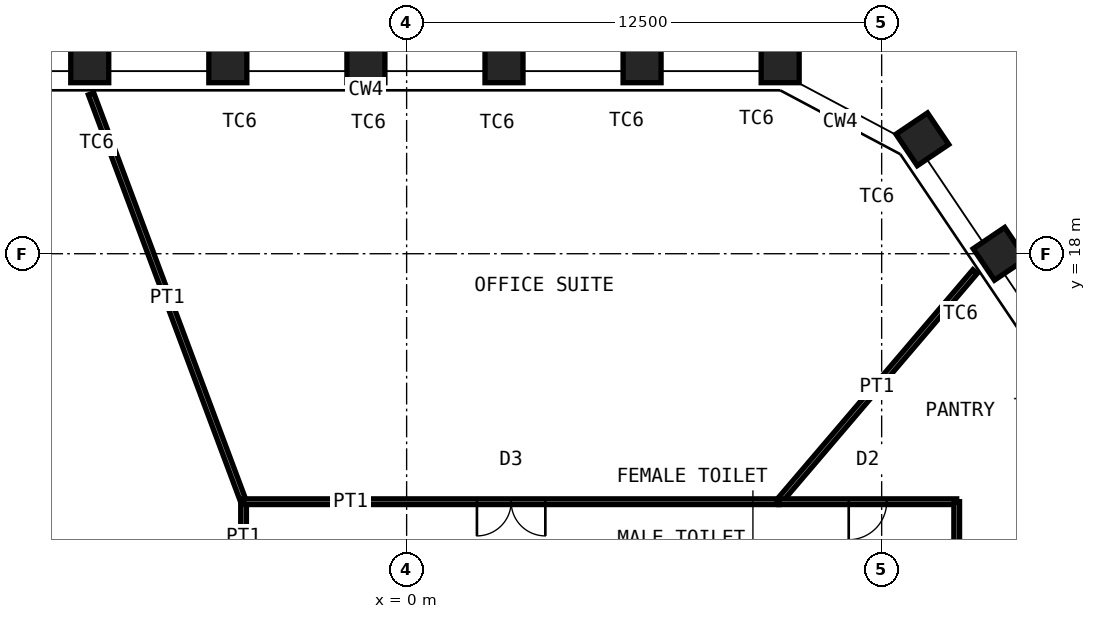
"""IFC4 building model, lengths in metres.
Left out: names, types, materials, properties, quantities, classifications, styles, units other than length and angle.
Written with IfcOpenShell. Run it as: python <this file> out.ifc"""

import sys

from ifc_helpers import new_model, si_unit, direction, frame, frame_2d, origin, origin_2d, place, context, subcontext, project, spatial, rectangle, hollow_rectangle, extrude, element, fill, save


model = new_model("IFC4")
c1 = context("Model", 3, precision=1e-05, world=origin(), true_north=direction((0.0, 1.0)))
c2 = subcontext(c1, "Body", "Model", "MODEL_VIEW")
j1 = project(units=[si_unit("LENGTHUNIT", "METRE"), si_unit("PLANEANGLEUNIT", "RADIAN")], contexts=[c1])
p1 = place(None, origin())
s1 = spatial("IfcSite", under=j1, at=p1, CompositionType="ELEMENT")
p2 = place(p1, origin())
s2 = spatial("IfcBuilding", under=s1, at=p2, CompositionType="ELEMENT")
p3 = place(p2, frame((0.0, 0.0, 247.6)))
s3 = spatial("IfcBuildingStorey", under=s2, at=p3, CompositionType="ELEMENT", Elevation=247.6)
for number, where, z_axis, x_axis in (
    (1, (-8.338, 23.0, 0.0), (0.0, 0.0, 1.0), (-1.0, 0.0, 0.0)),
    (2, (-4.705, 23.0, 0.0), (0.0, 0.0, 1.0), (-1.0, 0.0, 0.0)),
    (3, (-1.071, 23.0, 0.0), (0.0, 0.0, 1.0), (-1.0, 0.0, 0.0)),
    (4, (2.562, 23.0, 0.0), (0.0, 0.0, 1.0), (-1.0, 0.0, 0.0)),
    (5, (6.196, 23.0, 0.0), (0.0, 0.0, 1.0), (-1.0, 0.0, 0.0)),
    (6, (9.829, 23.0, 0.0), (0.0, 0.0, 1.0), (-1.0, 0.0, 0.0)),
    (7, (13.571, 21.01, 0.0), (0.0, 0.0, 1.0), (-0.559, 0.829, 0.0)),
    (8, (15.603, 17.998, 0.0), (0.0, 0.0, 1.0), (-0.559, 0.829, 0.0)),
):
    element("IfcColumn", number, at=place(p3, frame(where, z_axis=z_axis, x_axis=x_axis)), inside=s3, PredefinedType="COLUMN", context=c2, shape_type="SweptSolid", body=[
        extrude(hollow_rectangle(XDim=1.0, YDim=1.0, WallThickness=0.06, at=origin_2d()), origin(), (0.0, 0.0, 1.0), 4.2),
    ])
p4 = place(p3, frame((-4.291, 9.6, 0.0), z_axis=(0.0, 0.0, 1.0), x_axis=(0.0, 1.0, 0.0)))
e9 = element("IfcWall", 9, at=p4, inside=s3, PredefinedType="PARTITIONING", context=c2, shape_type="SweptSolid", body=[
    extrude(rectangle(XDim=1.875, YDim=0.15, at=frame_2d((0.938, 0.0))), origin(), (0.0, 0.0, 1.0), 4.03),
])
p5 = place(p3, frame((-8.303, 22.206, 0.0), z_axis=(0.0, 0.0, 1.0), x_axis=(0.350242883069, -0.936658914899, 0.0)))
e10 = element("IfcWall", 10, at=p5, inside=s3, PredefinedType="PARTITIONING", context=c2, shape_type="SweptSolid", body=[
    extrude(rectangle(XDim=11.457, YDim=0.15, at=frame_2d((5.729, 0.0))), origin(), (0.0, 0.0, 1.0), 2.93),
])
p6 = place(p3, frame((-4.291, 11.475, 0.0), z_axis=(0.0, 0.0, 1.0), x_axis=(1.0, 0.0, 0.0)))
e11 = element("IfcWall", 11, at=p6, inside=s3, PredefinedType="PARTITIONING", context=c2, shape_type="SweptSolid", body=[
    extrude(rectangle(XDim=14.082, YDim=0.15, at=frame_2d((7.041, 0.0))), origin(), (0.0, 0.0, 1.0), 4.03),
])
p7 = place(p6, frame((6.141, 0.0, 0.0)))
e12 = element("IfcOpeningElement", 12, at=p7, cuts=e11, PredefinedType="OPENING", context=c2, shape_type="SweptSolid", body=[
    extrude(rectangle(XDim=1.8, YDim=2.4, at=frame_2d((0.9, 1.2))), frame((0.0, 0.085, 0.0), z_axis=(0.0, -1.0, 0.0), x_axis=(1.0, 0.0, 0.0)), (0.0, 0.0, 1.0), 0.17),
])
p8 = place(p3, frame((14.958, 17.531, 0.0), z_axis=(0.0, 0.0, 1.0), x_axis=(-0.649097500837, -0.760705221756, 0.0)))
e13 = element("IfcWall", 13, at=p8, inside=s3, PredefinedType="PARTITIONING", context=c2, shape_type="SweptSolid", body=[
    extrude(rectangle(XDim=7.96, YDim=0.15, at=frame_2d((3.98, 0.0))), origin(), (0.0, 0.0, 1.0), 2.93),
])
p9 = place(p3, frame((9.791, 11.475, 0.0), z_axis=(0.0, 0.0, 1.0), x_axis=(1.0, 0.0, 0.0)))
e14 = element("IfcWall", 14, at=p9, inside=s3, PredefinedType="PARTITIONING", context=c2, shape_type="SweptSolid", body=[
    extrude(rectangle(XDim=4.684, YDim=0.15, at=frame_2d((2.342, 0.0))), origin(), (0.0, 0.0, 1.0), 4.03),
])
p10 = place(p9, frame((1.842, 0.0, 0.0)))
e15 = element("IfcOpeningElement", 15, at=p10, cuts=e14, PredefinedType="OPENING", context=c2, shape_type="SweptSolid", body=[
    extrude(rectangle(XDim=1.0, YDim=2.4, at=frame_2d((0.5, 1.2))), frame((0.0, 0.085, 0.0), z_axis=(0.0, -1.0, 0.0), x_axis=(1.0, 0.0, 0.0)), (0.0, 0.0, 1.0), 0.17),
])
p11 = place(p3, frame((14.475, 11.475, 0.0), z_axis=(0.0, 0.0, 1.0), x_axis=(0.0, -1.0, 0.0)))
e16 = element("IfcWall", 16, at=p11, inside=s3, PredefinedType="PARTITIONING", context=c2, shape_type="SweptSolid", body=[
    extrude(rectangle(XDim=2.692, YDim=0.15, at=frame_2d((1.346, 0.0))), origin(), (0.0, 0.0, 1.0), 4.03),
])
p12 = place(p3, frame((19.001, 11.53, 0.0), z_axis=(0.0, 0.0, 1.0), x_axis=(-0.854906581035, -0.518781975114, 0.0)))
e17 = element("IfcWall", 17, at=p12, inside=s3, PredefinedType="PARTITIONING", context=c2, shape_type="SweptSolid", body=[
    extrude(rectangle(XDim=5.294, YDim=0.15, at=frame_2d((2.647, 0.0))), origin(), (0.0, 0.0, 1.0), 2.93),
])
p13 = place(p7, origin())
e18 = element("IfcDoor", 18, at=p13, inside=s3, OperationType="DOUBLE_DOOR_DOUBLE_SWING", PredefinedType="DOOR", context=c2, shape_type="SweptSolid", body=[
    extrude(rectangle(XDim=1.8, YDim=2.4, at=frame_2d((0.9, 1.2))), frame((0.0, 0.025, 0.0), z_axis=(0.0, -1.0, 0.0), x_axis=(1.0, 0.0, 0.0)), (0.0, 0.0, 1.0), 0.05),
])
fill(e12, e18)
p14 = place(p10, origin())
e19 = element("IfcDoor", 19, at=p14, inside=s3, OperationType="SINGLE_SWING_LEFT", PredefinedType="DOOR", context=c2, shape_type="SweptSolid", body=[
    extrude(rectangle(XDim=1.0, YDim=2.4, at=frame_2d((0.5, 1.2))), frame((0.0, 0.025, 0.0), z_axis=(0.0, -1.0, 0.0), x_axis=(1.0, 0.0, 0.0)), (0.0, 0.0, 1.0), 0.05),
])
fill(e15, e19)
save(model, sys.argv[1])
